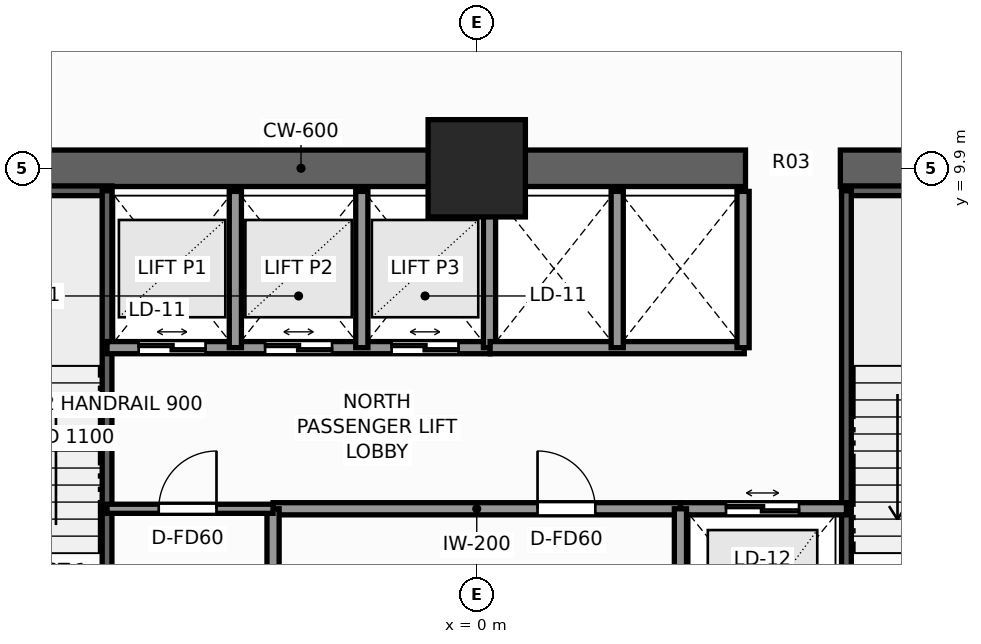
"""IFC4 building model, lengths in metres.
Left out: names, types, materials, properties, quantities, classifications, styles, units other than length and angle.
Written with IfcOpenShell. Run it as: python <this file> out.ifc"""

import sys

from ifc_helpers import new_model, si_unit, direction, frame, frame_2d, origin, origin_2d, place, context, subcontext, project, spatial, rectangle, extrude, element, fill, save


model = new_model("IFC4")
c1 = context("Model", 3, precision=1e-05, world=origin(), true_north=direction((0.0, 1.0)))
c2 = subcontext(c1, "Body", "Model", "MODEL_VIEW")
j1 = project(units=[si_unit("LENGTHUNIT", "METRE"), si_unit("PLANEANGLEUNIT", "RADIAN")], contexts=[c1])
p1 = place(None, origin())
s1 = spatial("IfcSite", under=j1, at=p1, CompositionType="ELEMENT")
p2 = place(p1, origin())
s2 = spatial("IfcBuilding", under=s1, at=p2, CompositionType="ELEMENT")
p3 = place(p2, frame((0.0, 0.0, 15.2)))
s3 = spatial("IfcBuildingStorey", under=s2, at=p3, CompositionType="ELEMENT", Elevation=15.2)
p4 = place(p3, frame((-10.2, 9.9, 0.0), z_axis=(0.0, 0.0, 1.0), x_axis=(1.0, 0.0, 0.0)))
e1 = element("IfcWall", 1, at=p4, inside=s3, PredefinedType="SHEAR", context=c2, shape_type="SweptSolid", body=[
    extrude(rectangle(XDim=14.62, YDim=0.6, at=frame_2d((7.31, 0.0))), origin(), (0.0, 0.0, 1.0), 4.1),
])
p5 = place(p3, frame((5.98, 9.9, 0.0), z_axis=(0.0, 0.0, 1.0), x_axis=(1.0, 0.0, 0.0)))
e2 = element("IfcWall", 2, at=p5, inside=s3, PredefinedType="SHEAR", context=c2, shape_type="SweptSolid", body=[
    extrude(rectangle(XDim=4.22, YDim=0.6, at=frame_2d((2.11, 0.0))), origin(), (0.0, 0.0, 1.0), 4.1),
])
p6 = place(p3, frame((0.0, 9.9, 0.0), z_axis=(0.0, 0.0, 1.0), x_axis=(1.0, 0.0, 0.0)))
e3 = element("IfcColumn", 3, at=p6, inside=s3, PredefinedType="COLUMN", context=c2, shape_type="SweptSolid", body=[
    extrude(rectangle(XDim=1.6, YDim=1.6, at=origin_2d()), origin(), (0.0, 0.0, 1.0), 4.1),
])
p7 = place(p3, frame((-9.52, 9.53, 0.0), z_axis=(0.0, 0.0, 1.0), x_axis=(1.0, 0.0, 0.0)))
e4 = element("IfcWall", 4, at=p7, inside=s3, PredefinedType="SHEAR", context=c2, shape_type="SweptSolid", body=[
    extrude(rectangle(XDim=3.52, YDim=0.16, at=frame_2d((1.76, 0.0))), origin(), (0.0, 0.0, 1.0), 4.1),
])
p8 = place(p3, frame((-6.08, 1.97, 0.0), z_axis=(0.0, 0.0, 1.0), x_axis=(0.0, 1.0, 0.0)))
e5 = element("IfcWall", 5, at=p8, inside=s3, PredefinedType="SHEAR", context=c2, shape_type="SweptSolid", body=[
    extrude(rectangle(XDim=7.56, YDim=0.16, at=frame_2d((3.78, 0.0))), origin(), (0.0, 0.0, 1.0), 4.1),
])
p9 = place(p3, frame((6.0, 9.53, 0.0), z_axis=(0.0, 0.0, 1.0), x_axis=(1.0, 0.0, 0.0)))
e6 = element("IfcWall", 6, at=p9, inside=s3, PredefinedType="SHEAR", context=c2, shape_type="SweptSolid", body=[
    extrude(rectangle(XDim=3.52, YDim=0.16, at=frame_2d((1.76, 0.0))), origin(), (0.0, 0.0, 1.0), 4.1),
])
p10 = place(p3, frame((6.08, 1.97, 0.0), z_axis=(0.0, 0.0, 1.0), x_axis=(0.0, 1.0, 0.0)))
e7 = element("IfcWall", 7, at=p10, inside=s3, PredefinedType="SHEAR", context=c2, shape_type="SweptSolid", body=[
    extrude(rectangle(XDim=7.56, YDim=0.16, at=frame_2d((3.78, 0.0))), origin(), (0.0, 0.0, 1.0), 4.1),
])
p11 = place(p3, frame((3.35, 4.3, 0.0), z_axis=(0.0, 0.0, 1.0), x_axis=(1.0, 0.0, 0.0)))
e8 = element("IfcWall", 8, at=p11, inside=s3, PredefinedType="SOLIDWALL", context=c2, shape_type="SweptSolid", body=[
    extrude(rectangle(XDim=2.73, YDim=0.2, at=frame_2d((1.365, 0.0))), origin(), (0.0, 0.0, 1.0), 3.7),
])
p12 = place(p11, frame((0.75, 0.0, 0.0)))
e9 = element("IfcOpeningElement", 9, at=p12, cuts=e8, PredefinedType="OPENING", context=c2, shape_type="SweptSolid", body=[
    extrude(rectangle(XDim=1.2, YDim=2.25, at=frame_2d((0.6, 1.125))), frame((0.0, 0.11, 0.0), z_axis=(0.0, -1.0, 0.0), x_axis=(1.0, 0.0, 0.0)), (0.0, 0.0, 1.0), 0.22),
])
p13 = place(p3, frame((-6.08, 6.95, 0.0), z_axis=(0.0, 0.0, 1.0), x_axis=(1.0, 0.0, 0.0)))
e10 = element("IfcWall", 10, at=p13, inside=s3, PredefinedType="SOLIDWALL", context=c2, shape_type="SweptSolid", body=[
    extrude(rectangle(XDim=6.3, YDim=0.2, at=frame_2d((3.15, 0.0))), origin(), (0.0, 0.0, 1.0), 3.7),
])
p14 = place(p13, frame((0.52, 0.0, 0.0)))
e11 = element("IfcOpeningElement", 11, at=p14, cuts=e10, PredefinedType="OPENING", context=c2, shape_type="SweptSolid", body=[
    extrude(rectangle(XDim=1.1, YDim=2.2, at=frame_2d((0.55, 1.1))), frame((0.0, 0.11, 0.0), z_axis=(0.0, -1.0, 0.0), x_axis=(1.0, 0.0, 0.0)), (0.0, 0.0, 1.0), 0.22),
])
p15 = place(p13, frame((2.6, 0.0, 0.0)))
e12 = element("IfcOpeningElement", 12, at=p15, cuts=e10, PredefinedType="OPENING", context=c2, shape_type="SweptSolid", body=[
    extrude(rectangle(XDim=1.1, YDim=2.2, at=frame_2d((0.55, 1.1))), frame((0.0, 0.11, 0.0), z_axis=(0.0, -1.0, 0.0), x_axis=(1.0, 0.0, 0.0)), (0.0, 0.0, 1.0), 0.22),
])
p16 = place(p13, frame((4.68, 0.0, 0.0)))
e13 = element("IfcOpeningElement", 13, at=p16, cuts=e10, PredefinedType="OPENING", context=c2, shape_type="SweptSolid", body=[
    extrude(rectangle(XDim=1.1, YDim=2.2, at=frame_2d((0.55, 1.1))), frame((0.0, 0.11, 0.0), z_axis=(0.0, -1.0, 0.0), x_axis=(1.0, 0.0, 0.0)), (0.0, 0.0, 1.0), 0.22),
])
for number, where, z_axis, x_axis in (
    (14, (-3.97, 6.95, 0.0), (0.0, 0.0, 1.0), (0.0, 1.0, 0.0)),
    (15, (-1.89, 6.95, 0.0), (0.0, 0.0, 1.0), (0.0, 1.0, 0.0)),
    (16, (0.21, 6.95, 0.0), (0.0, 0.0, 1.0), (0.0, 1.0, 0.0)),
):
    element("IfcWall", number, at=place(p3, frame(where, z_axis=z_axis, x_axis=x_axis)), inside=s3, PredefinedType="SOLIDWALL", context=c2, shape_type="SweptSolid", body=[
        extrude(rectangle(XDim=2.57, YDim=0.2, at=frame_2d((1.285, 0.0))), origin(), (0.0, 0.0, 1.0), 3.7),
    ])
p17 = place(p3, frame((0.22, 6.95, 0.0), z_axis=(0.0, 0.0, 1.0), x_axis=(1.0, 0.0, 0.0)))
e17 = element("IfcWall", 17, at=p17, inside=s3, PredefinedType="SOLIDWALL", context=c2, shape_type="SweptSolid", body=[
    extrude(rectangle(XDim=4.18, YDim=0.2, at=frame_2d((2.09, 0.0))), origin(), (0.0, 0.0, 1.0), 3.7),
])
for number, where, z_axis, x_axis in (
    (18, (4.38, 6.95, 0.0), (0.0, 0.0, 1.0), (0.0, 1.0, 0.0)),
    (19, (2.31, 6.95, 0.0), (0.0, 0.0, 1.0), (0.0, 1.0, 0.0)),
):
    element("IfcWall", number, at=place(p3, frame(where, z_axis=z_axis, x_axis=x_axis)), inside=s3, PredefinedType="SOLIDWALL", context=c2, shape_type="SweptSolid", body=[
        extrude(rectangle(XDim=2.57, YDim=0.2, at=frame_2d((1.285, 0.0))), origin(), (0.0, 0.0, 1.0), 3.7),
    ])
p18 = place(p3, frame((-3.35, 4.3, 0.0), z_axis=(0.0, 0.0, 1.0), x_axis=(1.0, 0.0, 0.0)))
e20 = element("IfcWall", 20, at=p18, inside=s3, PredefinedType="SOLIDWALL", context=c2, shape_type="SweptSolid", body=[
    extrude(rectangle(XDim=6.7, YDim=0.2, at=frame_2d((3.35, 0.0))), origin(), (0.0, 0.0, 1.0), 3.7),
])
p19 = place(p18, frame((4.35, 0.0, 0.0)))
e21 = element("IfcOpeningElement", 21, at=p19, cuts=e20, PredefinedType="OPENING", context=c2, shape_type="SweptSolid", body=[
    extrude(rectangle(XDim=0.95, YDim=2.06, at=frame_2d((0.475, 1.03))), frame((0.0, 0.11, 0.0), z_axis=(0.0, -1.0, 0.0), x_axis=(1.0, 0.0, 0.0)), (0.0, 0.0, 1.0), 0.22),
])
for number, where, z_axis, x_axis in (
    (22, (-3.35, 1.1, 0.0), (0.0, 0.0, 1.0), (0.0, 1.0, 0.0)),
    (23, (3.35, 1.1, 0.0), (0.0, 0.0, 1.0), (0.0, 1.0, 0.0)),
):
    element("IfcWall", number, at=place(p3, frame(where, z_axis=z_axis, x_axis=x_axis)), inside=s3, PredefinedType="SOLIDWALL", context=c2, shape_type="SweptSolid", body=[
        extrude(rectangle(XDim=3.2, YDim=0.2, at=frame_2d((1.6, 0.0))), origin(), (0.0, 0.0, 1.0), 3.7),
    ])
p20 = place(p3, frame((-6.08, 4.3, 0.0), z_axis=(0.0, 0.0, 1.0), x_axis=(1.0, 0.0, 0.0)))
e24 = element("IfcWall", 24, at=p20, inside=s3, PredefinedType="PARTITIONING", context=c2, shape_type="SweptSolid", body=[
    extrude(rectangle(XDim=2.73, YDim=0.15, at=frame_2d((1.365, 0.0))), origin(), (0.0, 0.0, 1.0), 3.7),
])
p21 = place(p20, frame((0.85, 0.0, 0.0)))
e25 = element("IfcOpeningElement", 25, at=p21, cuts=e24, PredefinedType="OPENING", context=c2, shape_type="SweptSolid", body=[
    extrude(rectangle(XDim=0.95, YDim=2.06, at=frame_2d((0.475, 1.03))), frame((0.0, 0.085, 0.0), z_axis=(0.0, -1.0, 0.0), x_axis=(1.0, 0.0, 0.0)), (0.0, 0.0, 1.0), 0.17),
])
p22 = place(p12, origin())
e26 = element("IfcDoor", 26, at=p22, inside=s3, OperationType="DOUBLE_DOOR_SLIDING", PredefinedType="DOOR", context=c2, shape_type="SweptSolid", body=[
    extrude(rectangle(XDim=1.2, YDim=2.25, at=frame_2d((0.6, 1.125))), frame((0.0, 0.025, 0.0), z_axis=(0.0, -1.0, 0.0), x_axis=(1.0, 0.0, 0.0)), (0.0, 0.0, 1.0), 0.05),
])
fill(e9, e26)
p23 = place(p14, origin())
e27 = element("IfcDoor", 27, at=p23, inside=s3, OperationType="DOUBLE_DOOR_SLIDING", PredefinedType="DOOR", context=c2, shape_type="SweptSolid", body=[
    extrude(rectangle(XDim=1.1, YDim=2.2, at=frame_2d((0.55, 1.1))), frame((0.0, 0.025, 0.0), z_axis=(0.0, -1.0, 0.0), x_axis=(1.0, 0.0, 0.0)), (0.0, 0.0, 1.0), 0.05),
])
fill(e11, e27)
p24 = place(p15, origin())
e28 = element("IfcDoor", 28, at=p24, inside=s3, OperationType="DOUBLE_DOOR_SLIDING", PredefinedType="DOOR", context=c2, shape_type="SweptSolid", body=[
    extrude(rectangle(XDim=1.1, YDim=2.2, at=frame_2d((0.55, 1.1))), frame((0.0, 0.025, 0.0), z_axis=(0.0, -1.0, 0.0), x_axis=(1.0, 0.0, 0.0)), (0.0, 0.0, 1.0), 0.05),
])
fill(e12, e28)
p25 = place(p16, origin())
e29 = element("IfcDoor", 29, at=p25, inside=s3, OperationType="DOUBLE_DOOR_SLIDING", PredefinedType="DOOR", context=c2, shape_type="SweptSolid", body=[
    extrude(rectangle(XDim=1.1, YDim=2.2, at=frame_2d((0.55, 1.1))), frame((0.0, 0.025, 0.0), z_axis=(0.0, -1.0, 0.0), x_axis=(1.0, 0.0, 0.0)), (0.0, 0.0, 1.0), 0.05),
])
fill(e13, e29)
p26 = place(p19, origin())
e30 = element("IfcDoor", 30, at=p26, inside=s3, OperationType="SINGLE_SWING_LEFT", PredefinedType="DOOR", context=c2, shape_type="SweptSolid", body=[
    extrude(rectangle(XDim=0.95, YDim=2.06, at=frame_2d((0.475, 1.03))), frame((0.0, 0.025, 0.0), z_axis=(0.0, -1.0, 0.0), x_axis=(1.0, 0.0, 0.0)), (0.0, 0.0, 1.0), 0.05),
])
fill(e21, e30)
p27 = place(p21, origin())
e31 = element("IfcDoor", 31, at=p27, inside=s3, OperationType="SINGLE_SWING_RIGHT", PredefinedType="DOOR", context=c2, shape_type="SweptSolid", body=[
    extrude(rectangle(XDim=0.95, YDim=2.06, at=frame_2d((0.475, 1.03))), frame((0.0, 0.025, 0.0), z_axis=(0.0, -1.0, 0.0), x_axis=(1.0, 0.0, 0.0)), (0.0, 0.0, 1.0), 0.05),
])
fill(e25, e31)
save(model, sys.argv[1])
